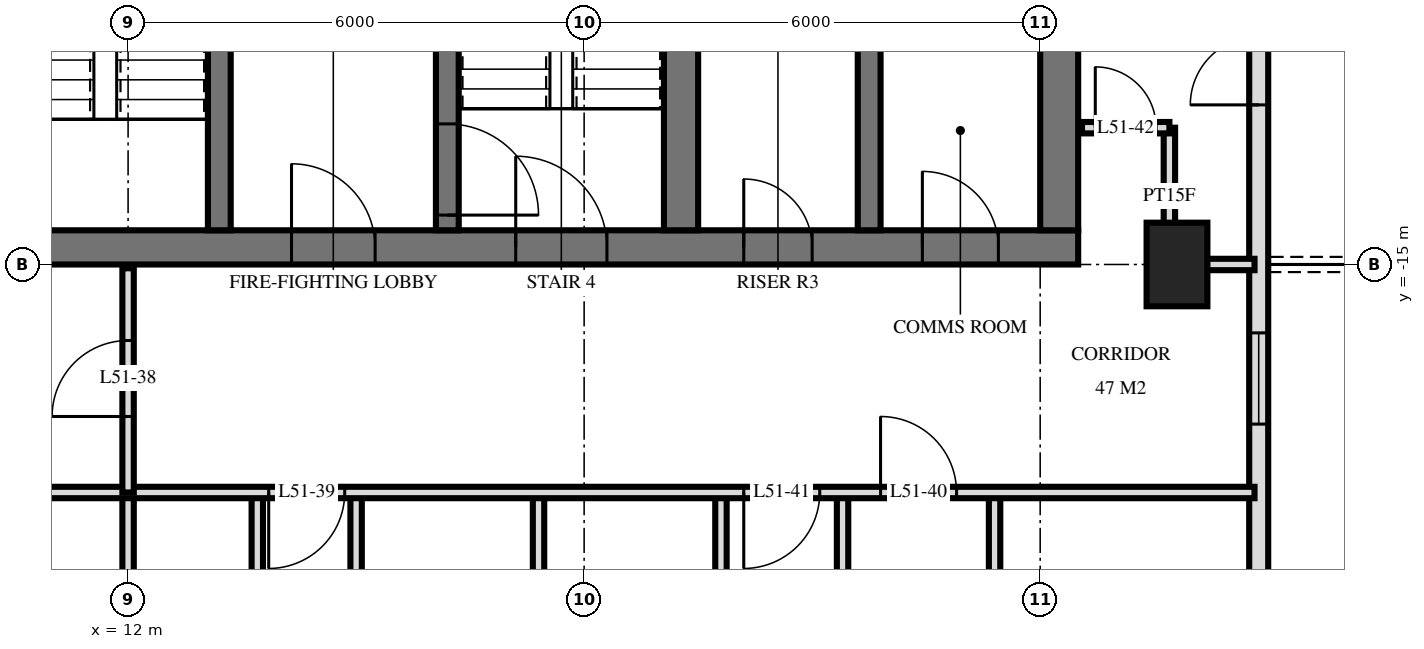
"""IFC4 building model, lengths in metres.
Left out: names, types, materials, properties, quantities, classifications, styles, units other than length and angle.
Written with IfcOpenShell. Run it as: python <this file> out.ifc"""

import sys

from ifc_helpers import new_model, si_unit, direction, frame, frame_2d, origin, origin_2d, place, context, subcontext, project, spatial, rectangle, extrude, element, fill, save


model = new_model("IFC4")
c1 = context("Model", 3, precision=1e-05, world=origin(), true_north=direction((0.0, 1.0)))
c2 = subcontext(c1, "Body", "Model", "MODEL_VIEW")
j1 = project(units=[si_unit("LENGTHUNIT", "METRE"), si_unit("PLANEANGLEUNIT", "RADIAN")], contexts=[c1])
p1 = place(None, origin())
s1 = spatial("IfcSite", under=j1, at=p1, CompositionType="ELEMENT")
p2 = place(p1, origin())
s2 = spatial("IfcBuilding", under=s1, at=p2, CompositionType="ELEMENT")
p3 = place(p2, frame((0.0, 0.0, 197.6)))
s3 = spatial("IfcBuildingStorey", under=s2, at=p3, CompositionType="ELEMENT", Elevation=197.6)
p4 = place(p3, frame((25.8, -15.0, 0.0), z_axis=(0.0, 0.0, 1.0), x_axis=(0.0, 1.0, 0.0)))
e1 = element("IfcColumn", 1, at=p4, inside=s3, PredefinedType="COLUMN", context=c2, shape_type="SweptSolid", body=[
    extrude(rectangle(XDim=1.1, YDim=0.8, at=origin_2d()), origin(), (0.0, 0.0, 1.0), 3.5),
])
p5 = place(p3, frame((10.0, -14.775, 0.0), z_axis=(0.0, 0.0, 1.0), x_axis=(1.0, 0.0, 0.0)))
e2 = element("IfcWall", 2, at=p5, inside=s3, PredefinedType="SHEAR", context=c2, shape_type="SweptSolid", body=[
    extrude(rectangle(XDim=14.5, YDim=0.45, at=frame_2d((7.25, 0.0))), origin(), (0.0, 0.0, 1.0), 3.5),
])
p6 = place(p5, frame((7.1, 0.0, 0.0)))
e3 = element("IfcOpeningElement", 3, at=p6, cuts=e2, PredefinedType="OPENING", context=c2, shape_type="SweptSolid", body=[
    extrude(rectangle(XDim=1.2, YDim=2.1, at=frame_2d((0.6, 1.05))), frame((0.0, 0.235, 0.0), z_axis=(0.0, -1.0, 0.0), x_axis=(1.0, 0.0, 0.0)), (0.0, 0.0, 1.0), 0.47),
])
p7 = place(p5, frame((4.15, 0.0, 0.0)))
e4 = element("IfcOpeningElement", 4, at=p7, cuts=e2, PredefinedType="OPENING", context=c2, shape_type="SweptSolid", body=[
    extrude(rectangle(XDim=1.1, YDim=2.1, at=frame_2d((0.55, 1.05))), frame((0.0, 0.235, 0.0), z_axis=(0.0, -1.0, 0.0), x_axis=(1.0, 0.0, 0.0)), (0.0, 0.0, 1.0), 0.47),
])
p8 = place(p5, frame((10.1, 0.0, 0.0)))
e5 = element("IfcOpeningElement", 5, at=p8, cuts=e2, PredefinedType="OPENING", context=c2, shape_type="SweptSolid", body=[
    extrude(rectangle(XDim=0.9, YDim=2.1, at=frame_2d((0.45, 1.05))), frame((0.0, 0.235, 0.0), z_axis=(0.0, -1.0, 0.0), x_axis=(1.0, 0.0, 0.0)), (0.0, 0.0, 1.0), 0.47),
])
p9 = place(p5, frame((12.45, 0.0, 0.0)))
e6 = element("IfcOpeningElement", 6, at=p9, cuts=e2, PredefinedType="OPENING", context=c2, shape_type="SweptSolid", body=[
    extrude(rectangle(XDim=1.0, YDim=2.1, at=frame_2d((0.5, 1.05))), frame((0.0, 0.235, 0.0), z_axis=(0.0, -1.0, 0.0), x_axis=(1.0, 0.0, 0.0)), (0.0, 0.0, 1.0), 0.47),
])
p10 = place(p3, frame((24.25, -14.55, 0.0), z_axis=(0.0, 0.0, 1.0), x_axis=(0.0, 1.0, 0.0)))
e7 = element("IfcWall", 7, at=p10, inside=s3, PredefinedType="SHEAR", context=c2, shape_type="SweptSolid", body=[
    extrude(rectangle(XDim=14.1, YDim=0.5, at=frame_2d((7.05, 0.0))), origin(), (0.0, 0.0, 1.0), 3.5),
])
p11 = place(p3, frame((13.2, -14.55, 0.0), z_axis=(0.0, 0.0, 1.0), x_axis=(0.0, 1.0, 0.0)))
e8 = element("IfcWall", 8, at=p11, inside=s3, PredefinedType="SHEAR", context=c2, shape_type="SweptSolid", body=[
    extrude(rectangle(XDim=5.4, YDim=0.3, at=frame_2d((2.7, 0.0))), origin(), (0.0, 0.0, 1.0), 3.5),
])
p12 = place(p11, frame((4.0, 0.0, 0.0)))
e9 = element("IfcOpeningElement", 9, at=p12, cuts=e8, PredefinedType="OPENING", context=c2, shape_type="SweptSolid", body=[
    extrude(rectangle(XDim=1.2, YDim=2.1, at=frame_2d((0.6, 1.05))), frame((0.0, 0.16, 0.0), z_axis=(0.0, -1.0, 0.0), x_axis=(1.0, 0.0, 0.0)), (0.0, 0.0, 1.0), 0.32),
])
p13 = place(p3, frame((16.2, -14.55, 0.0), z_axis=(0.0, 0.0, 1.0), x_axis=(0.0, 1.0, 0.0)))
e10 = element("IfcWall", 10, at=p13, inside=s3, PredefinedType="SHEAR", context=c2, shape_type="SweptSolid", body=[
    extrude(rectangle(XDim=5.4, YDim=0.3, at=frame_2d((2.7, 0.0))), origin(), (0.0, 0.0, 1.0), 3.5),
])
p14 = place(p13, frame((0.2, 0.0, 0.0)))
e11 = element("IfcOpeningElement", 11, at=p14, cuts=e10, PredefinedType="OPENING", context=c2, shape_type="SweptSolid", body=[
    extrude(rectangle(XDim=1.2, YDim=2.1, at=frame_2d((0.6, 1.05))), frame((0.0, 0.16, 0.0), z_axis=(0.0, -1.0, 0.0), x_axis=(1.0, 0.0, 0.0)), (0.0, 0.0, 1.0), 0.32),
])
p15 = place(p3, frame((19.275, -14.55, 0.0), z_axis=(0.0, 0.0, 1.0), x_axis=(0.0, 1.0, 0.0)))
e12 = element("IfcWall", 12, at=p15, inside=s3, PredefinedType="SHEAR", context=c2, shape_type="SweptSolid", body=[
    extrude(rectangle(XDim=5.4, YDim=0.45, at=frame_2d((2.7, 0.0))), origin(), (0.0, 0.0, 1.0), 3.5),
])
p16 = place(p3, frame((21.75, -14.55, 0.0), z_axis=(0.0, 0.0, 1.0), x_axis=(0.0, 1.0, 0.0)))
e13 = element("IfcWall", 13, at=p16, inside=s3, PredefinedType="SHEAR", context=c2, shape_type="SweptSolid", body=[
    extrude(rectangle(XDim=5.4, YDim=0.3, at=frame_2d((2.7, 0.0))), origin(), (0.0, 0.0, 1.0), 3.5),
])
p17 = place(p3, frame((26.875, -24.875, 0.0), z_axis=(0.0, 0.0, 1.0), x_axis=(0.0, 1.0, 0.0)))
e14 = element("IfcWall", 14, at=p17, inside=s3, PredefinedType="SOLIDWALL", context=c2, shape_type="SweptSolid", body=[
    extrude(rectangle(XDim=21.551, YDim=0.25, at=frame_2d((10.775, 0.0))), origin(), (0.0, 0.0, 1.0), 3.22),
])
p18 = place(p17, frame((0.425, 0.0, 0.0)))
e15 = element("IfcOpeningElement", 15, at=p18, cuts=e14, PredefinedType="OPENING", context=c2, shape_type="SweptSolid", body=[
    extrude(rectangle(XDim=1.8, YDim=2.4, at=frame_2d((0.9, 1.2))), frame((0.0, 0.135, 0.0), z_axis=(0.0, -1.0, 0.0), x_axis=(1.0, 0.0, 0.0)), (0.0, 0.0, 1.0), 0.27),
])
p19 = place(p17, frame((3.875, 0.0, 0.0)))
e16 = element("IfcOpeningElement", 16, at=p19, cuts=e14, PredefinedType="OPENING", context=c2, shape_type="SweptSolid", body=[
    extrude(rectangle(XDim=1.8, YDim=2.4, at=frame_2d((0.9, 1.2))), frame((0.0, 0.135, 0.0), z_axis=(0.0, -1.0, 0.0), x_axis=(1.0, 0.0, 0.0)), (0.0, 0.0, 1.0), 0.27),
])
p20 = place(p17, frame((7.775, 0.0, 0.9)))
e17 = element("IfcOpeningElement", 17, at=p20, cuts=e14, PredefinedType="OPENING", context=c2, shape_type="SweptSolid", body=[
    extrude(rectangle(XDim=1.2, YDim=1.5, at=frame_2d((0.6, 0.75))), frame((0.0, 0.135, 0.0), z_axis=(0.0, -1.0, 0.0), x_axis=(1.0, 0.0, 0.0)), (0.0, 0.0, 1.0), 0.27),
])
p21 = place(p17, frame((11.975, 0.0, 0.0)))
e18 = element("IfcOpeningElement", 18, at=p21, cuts=e14, PredefinedType="OPENING", context=c2, shape_type="SweptSolid", body=[
    extrude(rectangle(XDim=1.8, YDim=2.4, at=frame_2d((0.9, 1.2))), frame((0.0, 0.135, 0.0), z_axis=(0.0, -1.0, 0.0), x_axis=(1.0, 0.0, 0.0)), (0.0, 0.0, 1.0), 0.27),
])
p22 = place(p3, frame((25.7, -15.0, 0.0), z_axis=(0.0, 0.0, 1.0), x_axis=(0.0, 1.0, 0.0)))
e19 = element("IfcWall", 19, at=p22, inside=s3, PredefinedType="PARTITIONING", context=c2, shape_type="SweptSolid", body=[
    extrude(rectangle(XDim=1.8, YDim=0.15, at=frame_2d((0.9, 0.0))), origin(), (0.0, 0.0, 1.0), 3.22),
])
p23 = place(p3, frame((23.4, -22.2, 0.0), z_axis=(0.0, 0.0, 1.0), x_axis=(0.0, 1.0, 0.0)))
e20 = element("IfcWall", 20, at=p23, inside=s3, PredefinedType="PARTITIONING", context=c2, shape_type="SweptSolid", body=[
    extrude(rectangle(XDim=4.2, YDim=0.15, at=frame_2d((2.1, 0.0))), origin(), (0.0, 0.0, 1.0), 3.22),
])
p24 = place(p23, frame((1.62, 0.0, 0.0)))
e21 = element("IfcOpeningElement", 21, at=p24, cuts=e20, PredefinedType="OPENING", context=c2, shape_type="SweptSolid", body=[
    extrude(rectangle(XDim=1.0, YDim=2.1, at=frame_2d((0.5, 1.05))), frame((0.0, 0.085, 0.0), z_axis=(0.0, -1.0, 0.0), x_axis=(1.0, 0.0, 0.0)), (0.0, 0.0, 1.0), 0.17),
])
for number, where, z_axis, x_axis in (
    (22, (21.4, -22.2, 0.0), (0.0, 0.0, 1.0), (0.0, 1.0, 0.0)),
    (23, (19.8, -22.2, 0.0), (0.0, 0.0, 1.0), (0.0, 1.0, 0.0)),
    (24, (17.4, -22.2, 0.0), (0.0, 0.0, 1.0), (0.0, 1.0, 0.0)),
):
    element("IfcWall", number, at=place(p3, frame(where, z_axis=z_axis, x_axis=x_axis)), inside=s3, PredefinedType="PARTITIONING", context=c2, shape_type="SweptSolid", body=[
        extrude(rectangle(XDim=4.2, YDim=0.15, at=frame_2d((2.1, 0.0))), origin(), (0.0, 0.0, 1.0), 3.22),
    ])
p25 = place(p3, frame((15.0, -29.22, 0.0), z_axis=(0.0, 0.0, 1.0), x_axis=(0.0, 1.0, 0.0)))
e25 = element("IfcWall", 25, at=p25, inside=s3, PredefinedType="PARTITIONING", context=c2, shape_type="SweptSolid", body=[
    extrude(rectangle(XDim=11.22, YDim=0.15, at=frame_2d((5.61, 0.0))), origin(), (0.0, 0.0, 1.0), 3.22),
])
p26 = place(p3, frame((13.7, -22.2, 0.0), z_axis=(0.0, 0.0, 1.0), x_axis=(0.0, 1.0, 0.0)))
e26 = element("IfcWall", 26, at=p26, inside=s3, PredefinedType="PARTITIONING", context=c2, shape_type="SweptSolid", body=[
    extrude(rectangle(XDim=4.2, YDim=0.15, at=frame_2d((2.1, 0.0))), origin(), (0.0, 0.0, 1.0), 3.22),
])
p27 = place(p26, frame((1.68, 0.0, 0.0)))
e27 = element("IfcOpeningElement", 27, at=p27, cuts=e26, PredefinedType="OPENING", context=c2, shape_type="SweptSolid", body=[
    extrude(rectangle(XDim=0.8, YDim=2.1, at=frame_2d((0.4, 1.05))), frame((0.0, 0.085, 0.0), z_axis=(0.0, -1.0, 0.0), x_axis=(1.0, 0.0, 0.0)), (0.0, 0.0, 1.0), 0.17),
])
p28 = place(p3, frame((12.0, -18.0, 0.0), z_axis=(0.0, 0.0, 1.0), x_axis=(0.0, 1.0, 0.0)))
e28 = element("IfcWall", 28, at=p28, inside=s3, PredefinedType="PARTITIONING", context=c2, shape_type="SweptSolid", body=[
    extrude(rectangle(XDim=2.95, YDim=0.15, at=frame_2d((1.475, 0.0))), origin(), (0.0, 0.0, 1.0), 3.22),
])
p29 = place(p28, frame((1.0, 0.0, 0.0)))
e29 = element("IfcOpeningElement", 29, at=p29, cuts=e28, PredefinedType="OPENING", context=c2, shape_type="SweptSolid", body=[
    extrude(rectangle(XDim=1.0, YDim=2.1, at=frame_2d((0.5, 1.05))), frame((0.0, 0.085, 0.0), z_axis=(0.0, -1.0, 0.0), x_axis=(1.0, 0.0, 0.0)), (0.0, 0.0, 1.0), 0.17),
])
p30 = place(p3, frame((12.0, -29.22, 0.0), z_axis=(0.0, 0.0, 1.0), x_axis=(0.0, 1.0, 0.0)))
e30 = element("IfcWall", 30, at=p30, inside=s3, PredefinedType="PARTITIONING", context=c2, shape_type="SweptSolid", body=[
    extrude(rectangle(XDim=11.22, YDim=0.15, at=frame_2d((5.61, 0.0))), origin(), (0.0, 0.0, 1.0), 3.22),
])
p31 = place(p3, frame((-26.82, -18.0, 0.0), z_axis=(0.0, 0.0, 1.0), x_axis=(1.0, 0.0, 0.0)))
e31 = element("IfcWall", 31, at=p31, inside=s3, PredefinedType="PARTITIONING", context=c2, shape_type="SweptSolid", body=[
    extrude(rectangle(XDim=53.64, YDim=0.15, at=frame_2d((26.82, 0.0))), origin(), (0.0, 0.0, 1.0), 3.22),
])
p32 = place(p31, frame((11.97, 0.0, 0.0)))
e32 = element("IfcOpeningElement", 32, at=p32, cuts=e31, PredefinedType="OPENING", context=c2, shape_type="SweptSolid", body=[
    extrude(rectangle(XDim=1.0, YDim=2.1, at=frame_2d((0.5, 1.05))), frame((0.0, 0.085, 0.0), z_axis=(0.0, -1.0, 0.0), x_axis=(1.0, 0.0, 0.0)), (0.0, 0.0, 1.0), 0.17),
])
p33 = place(p31, frame((3.92, 0.0, 0.0)))
e33 = element("IfcOpeningElement", 33, at=p33, cuts=e31, PredefinedType="OPENING", context=c2, shape_type="SweptSolid", body=[
    extrude(rectangle(XDim=1.0, YDim=2.1, at=frame_2d((0.5, 1.05))), frame((0.0, 0.085, 0.0), z_axis=(0.0, -1.0, 0.0), x_axis=(1.0, 0.0, 0.0)), (0.0, 0.0, 1.0), 0.17),
])
p34 = place(p31, frame((5.72, 0.0, 0.0)))
e34 = element("IfcOpeningElement", 34, at=p34, cuts=e31, PredefinedType="OPENING", context=c2, shape_type="SweptSolid", body=[
    extrude(rectangle(XDim=1.0, YDim=2.1, at=frame_2d((0.5, 1.05))), frame((0.0, 0.085, 0.0), z_axis=(0.0, -1.0, 0.0), x_axis=(1.0, 0.0, 0.0)), (0.0, 0.0, 1.0), 0.17),
])
p35 = place(p31, frame((40.67, 0.0, 0.0)))
e35 = element("IfcOpeningElement", 35, at=p35, cuts=e31, PredefinedType="OPENING", context=c2, shape_type="SweptSolid", body=[
    extrude(rectangle(XDim=1.0, YDim=2.1, at=frame_2d((0.5, 1.05))), frame((0.0, 0.085, 0.0), z_axis=(0.0, -1.0, 0.0), x_axis=(1.0, 0.0, 0.0)), (0.0, 0.0, 1.0), 0.17),
])
p36 = place(p31, frame((48.72, 0.0, 0.0)))
e36 = element("IfcOpeningElement", 36, at=p36, cuts=e31, PredefinedType="OPENING", context=c2, shape_type="SweptSolid", body=[
    extrude(rectangle(XDim=1.0, YDim=2.1, at=frame_2d((0.5, 1.05))), frame((0.0, 0.085, 0.0), z_axis=(0.0, -1.0, 0.0), x_axis=(1.0, 0.0, 0.0)), (0.0, 0.0, 1.0), 0.17),
])
p37 = place(p31, frame((46.92, 0.0, 0.0)))
e37 = element("IfcOpeningElement", 37, at=p37, cuts=e31, PredefinedType="OPENING", context=c2, shape_type="SweptSolid", body=[
    extrude(rectangle(XDim=1.0, YDim=2.1, at=frame_2d((0.5, 1.05))), frame((0.0, 0.085, 0.0), z_axis=(0.0, -1.0, 0.0), x_axis=(1.0, 0.0, 0.0)), (0.0, 0.0, 1.0), 0.17),
])
p38 = place(p31, frame((17.32, 0.0, 0.0)))
e38 = element("IfcOpeningElement", 38, at=p38, cuts=e31, PredefinedType="OPENING", context=c2, shape_type="SweptSolid", body=[
    extrude(rectangle(XDim=1.0, YDim=2.1, at=frame_2d((0.5, 1.05))), frame((0.0, 0.085, 0.0), z_axis=(0.0, -1.0, 0.0), x_axis=(1.0, 0.0, 0.0)), (0.0, 0.0, 1.0), 0.17),
])
p39 = place(p31, frame((23.32, 0.0, 0.0)))
e39 = element("IfcOpeningElement", 39, at=p39, cuts=e31, PredefinedType="OPENING", context=c2, shape_type="SweptSolid", body=[
    extrude(rectangle(XDim=1.0, YDim=2.1, at=frame_2d((0.5, 1.05))), frame((0.0, 0.085, 0.0), z_axis=(0.0, -1.0, 0.0), x_axis=(1.0, 0.0, 0.0)), (0.0, 0.0, 1.0), 0.17),
])
p40 = place(p31, frame((29.32, 0.0, 0.0)))
e40 = element("IfcOpeningElement", 40, at=p40, cuts=e31, PredefinedType="OPENING", context=c2, shape_type="SweptSolid", body=[
    extrude(rectangle(XDim=1.0, YDim=2.1, at=frame_2d((0.5, 1.05))), frame((0.0, 0.085, 0.0), z_axis=(0.0, -1.0, 0.0), x_axis=(1.0, 0.0, 0.0)), (0.0, 0.0, 1.0), 0.17),
])
p41 = place(p31, frame((35.32, 0.0, 0.0)))
e41 = element("IfcOpeningElement", 41, at=p41, cuts=e31, PredefinedType="OPENING", context=c2, shape_type="SweptSolid", body=[
    extrude(rectangle(XDim=1.0, YDim=2.1, at=frame_2d((0.5, 1.05))), frame((0.0, 0.085, 0.0), z_axis=(0.0, -1.0, 0.0), x_axis=(1.0, 0.0, 0.0)), (0.0, 0.0, 1.0), 0.17),
])
p42 = place(p3, frame((25.7, -15.0, 0.0), z_axis=(0.0, 0.0, 1.0), x_axis=(1.0, 0.0, 0.0)))
e42 = element("IfcWall", 42, at=p42, inside=s3, PredefinedType="PARTITIONING", context=c2, shape_type="SweptSolid", body=[
    extrude(rectangle(XDim=1.12, YDim=0.15, at=frame_2d((0.56, 0.0))), origin(), (0.0, 0.0, 1.0), 3.22),
])
p43 = place(p3, frame((24.55, -13.2, 0.0), z_axis=(0.0, 0.0, 1.0), x_axis=(1.0, 0.0, 0.0)))
e43 = element("IfcWall", 43, at=p43, inside=s3, PredefinedType="PARTITIONING", context=c2, shape_type="SweptSolid", body=[
    extrude(rectangle(XDim=1.15, YDim=0.15, at=frame_2d((0.575, 0.0))), origin(), (0.0, 0.0, 1.0), 3.22),
])
p44 = place(p43, frame((0.175, 0.0, 0.0)))
e44 = element("IfcOpeningElement", 44, at=p44, cuts=e43, PredefinedType="OPENING", context=c2, shape_type="SweptSolid", body=[
    extrude(rectangle(XDim=0.8, YDim=2.1, at=frame_2d((0.4, 1.05))), frame((0.0, 0.085, 0.0), z_axis=(0.0, -1.0, 0.0), x_axis=(1.0, 0.0, 0.0)), (0.0, 0.0, 1.0), 0.17),
])
p45 = place(p20, origin())
e45 = element("IfcWindow", 45, at=p45, inside=s3, PartitioningType="SINGLE_PANEL", PredefinedType="WINDOW", context=c2, shape_type="SweptSolid", body=[
    extrude(rectangle(XDim=1.2, YDim=1.5, at=frame_2d((0.6, 0.75))), frame((0.0, 0.03, 0.0), z_axis=(0.0, -1.0, 0.0), x_axis=(1.0, 0.0, 0.0)), (0.0, 0.0, 1.0), 0.06),
])
fill(e17, e45)
p46 = place(p21, origin())
e46 = element("IfcDoor", 46, at=p46, inside=s3, OperationType="DOUBLE_DOOR_SINGLE_SWING", PredefinedType="DOOR", context=c2, shape_type="SweptSolid", body=[
    extrude(rectangle(XDim=1.8, YDim=2.4, at=frame_2d((0.9, 1.2))), frame((0.0, 0.025, 0.0), z_axis=(0.0, -1.0, 0.0), x_axis=(1.0, 0.0, 0.0)), (0.0, 0.0, 1.0), 0.05),
])
fill(e18, e46)
p47 = place(p6, origin())
e47 = element("IfcDoor", 47, at=p47, inside=s3, OperationType="SINGLE_SWING_RIGHT", PredefinedType="DOOR", context=c2, shape_type="SweptSolid", body=[
    extrude(rectangle(XDim=1.2, YDim=2.1, at=frame_2d((0.6, 1.05))), frame((0.0, 0.025, 0.0), z_axis=(0.0, -1.0, 0.0), x_axis=(1.0, 0.0, 0.0)), (0.0, 0.0, 1.0), 0.05),
])
fill(e3, e47)
p48 = place(p7, origin())
e48 = element("IfcDoor", 48, at=p48, inside=s3, OperationType="SINGLE_SWING_RIGHT", PredefinedType="DOOR", context=c2, shape_type="SweptSolid", body=[
    extrude(rectangle(XDim=1.1, YDim=2.1, at=frame_2d((0.55, 1.05))), frame((0.0, 0.025, 0.0), z_axis=(0.0, -1.0, 0.0), x_axis=(1.0, 0.0, 0.0)), (0.0, 0.0, 1.0), 0.05),
])
fill(e4, e48)
p49 = place(p8, origin())
e49 = element("IfcDoor", 49, at=p49, inside=s3, OperationType="SINGLE_SWING_RIGHT", PredefinedType="DOOR", context=c2, shape_type="SweptSolid", body=[
    extrude(rectangle(XDim=0.9, YDim=2.1, at=frame_2d((0.45, 1.05))), frame((0.0, 0.025, 0.0), z_axis=(0.0, -1.0, 0.0), x_axis=(1.0, 0.0, 0.0)), (0.0, 0.0, 1.0), 0.05),
])
fill(e5, e49)
p50 = place(p9, origin())
e50 = element("IfcDoor", 50, at=p50, inside=s3, OperationType="SINGLE_SWING_RIGHT", PredefinedType="DOOR", context=c2, shape_type="SweptSolid", body=[
    extrude(rectangle(XDim=1.0, YDim=2.1, at=frame_2d((0.5, 1.05))), frame((0.0, 0.025, 0.0), z_axis=(0.0, -1.0, 0.0), x_axis=(1.0, 0.0, 0.0)), (0.0, 0.0, 1.0), 0.05),
])
fill(e6, e50)
p51 = place(p14, frame((0.6, 0.0, 0.0), z_axis=(0.0, 0.0, 1.0), x_axis=(-1.0, 0.0, 0.0)))
e51 = element("IfcDoor", 51, at=p51, inside=s3, OperationType="SINGLE_SWING_LEFT", PredefinedType="DOOR", context=c2, shape_type="SweptSolid", body=[
    extrude(rectangle(XDim=1.2, YDim=2.1, at=frame_2d((0.0, 1.05))), frame((0.0, -0.025, 0.0), z_axis=(0.0, 1.0, 0.0), x_axis=(-1.0, 0.0, 0.0)), (0.0, 0.0, 1.0), 0.05),
])
fill(e11, e51)
p52 = place(p29, origin())
e52 = element("IfcDoor", 52, at=p52, inside=s3, OperationType="SINGLE_SWING_RIGHT", PredefinedType="DOOR", context=c2, shape_type="SweptSolid", body=[
    extrude(rectangle(XDim=1.0, YDim=2.1, at=frame_2d((0.5, 1.05))), frame((0.0, 0.025, 0.0), z_axis=(0.0, -1.0, 0.0), x_axis=(1.0, 0.0, 0.0)), (0.0, 0.0, 1.0), 0.05),
])
fill(e29, e52)
p53 = place(p35, frame((0.5, 0.0, 0.0), z_axis=(0.0, 0.0, 1.0), x_axis=(-1.0, 0.0, 0.0)))
e53 = element("IfcDoor", 53, at=p53, inside=s3, OperationType="SINGLE_SWING_LEFT", PredefinedType="DOOR", context=c2, shape_type="SweptSolid", body=[
    extrude(rectangle(XDim=1.0, YDim=2.1, at=frame_2d((0.0, 1.05))), frame((0.0, -0.025, 0.0), z_axis=(0.0, 1.0, 0.0), x_axis=(-1.0, 0.0, 0.0)), (0.0, 0.0, 1.0), 0.05),
])
fill(e35, e53)
p54 = place(p36, origin())
e54 = element("IfcDoor", 54, at=p54, inside=s3, OperationType="SINGLE_SWING_RIGHT", PredefinedType="DOOR", context=c2, shape_type="SweptSolid", body=[
    extrude(rectangle(XDim=1.0, YDim=2.1, at=frame_2d((0.5, 1.05))), frame((0.0, 0.025, 0.0), z_axis=(0.0, -1.0, 0.0), x_axis=(1.0, 0.0, 0.0)), (0.0, 0.0, 1.0), 0.05),
])
fill(e36, e54)
p55 = place(p37, frame((0.5, 0.0, 0.0), z_axis=(0.0, 0.0, 1.0), x_axis=(-1.0, 0.0, 0.0)))
e55 = element("IfcDoor", 55, at=p55, inside=s3, OperationType="SINGLE_SWING_LEFT", PredefinedType="DOOR", context=c2, shape_type="SweptSolid", body=[
    extrude(rectangle(XDim=1.0, YDim=2.1, at=frame_2d((0.0, 1.05))), frame((0.0, -0.025, 0.0), z_axis=(0.0, 1.0, 0.0), x_axis=(-1.0, 0.0, 0.0)), (0.0, 0.0, 1.0), 0.05),
])
fill(e37, e55)
p56 = place(p44, origin())
e56 = element("IfcDoor", 56, at=p56, inside=s3, OperationType="SINGLE_SWING_RIGHT", PredefinedType="DOOR", context=c2, shape_type="SweptSolid", body=[
    extrude(rectangle(XDim=0.8, YDim=2.1, at=frame_2d((0.4, 1.05))), frame((0.0, 0.025, 0.0), z_axis=(0.0, -1.0, 0.0), x_axis=(1.0, 0.0, 0.0)), (0.0, 0.0, 1.0), 0.05),
])
fill(e44, e56)
save(model, sys.argv[1])
